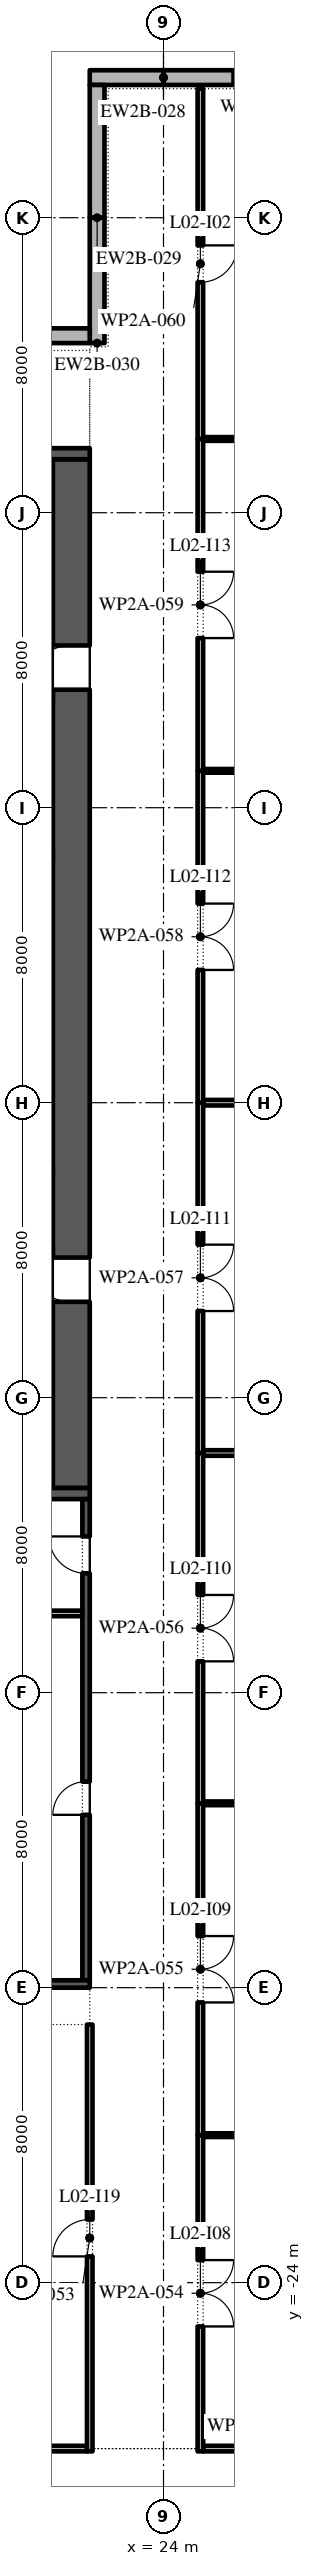
"""IFC4 building model, lengths in metres.
Left out: names, types, materials, properties, quantities, classifications, styles, units other than length and angle.
Written with IfcOpenShell. Run it as: python <this file> out.ifc"""

import sys

from ifc_helpers import new_model, si_unit, direction, frame, frame_2d, origin, place, context, subcontext, project, spatial, polyline, rectangle, outline, extrude, element, fill, save


model = new_model("IFC4")
c1 = context("Model", 3, precision=1e-05, world=origin(), true_north=direction((0.0, 1.0)))
c2 = subcontext(c1, "Body", "Model", "MODEL_VIEW")
j1 = project(units=[si_unit("LENGTHUNIT", "METRE"), si_unit("PLANEANGLEUNIT", "RADIAN")], contexts=[c1])
p1 = place(None, origin())
s1 = spatial("IfcSite", under=j1, at=p1, CompositionType="ELEMENT")
p2 = place(p1, origin())
s2 = spatial("IfcBuilding", under=s1, at=p2, CompositionType="ELEMENT")
p3 = place(p2, frame((0.0, 0.0, 14.0)))
s3 = spatial("IfcBuildingStorey", under=s2, at=p3, CompositionType="ELEMENT", Elevation=14.0)
p4 = place(p3, frame((32.0, 35.8, 0.0), z_axis=(0.0, 0.0, 1.0), x_axis=(-1.0, 0.0, 0.0)))
e1 = element("IfcWall", 1, at=p4, inside=s3, PredefinedType="STANDARD", context=c2, shape_type="SweptSolid", body=[
    extrude(rectangle(XDim=8.0, YDim=0.4, at=frame_2d((4.0, 0.0))), origin(), (0.0, 0.0, 1.0), 4.9),
])
p5 = place(p4, frame((1.9, 0.0, 0.9)))
e2 = element("IfcOpeningElement", 2, at=p5, cuts=e1, PredefinedType="OPENING", context=c2, shape_type="SweptSolid", body=[
    extrude(outline(polyline([(0.0, 0.0), (1.8, 0.0), (1.8, 1.841), (1.785, 2.076), (1.739, 2.307), (1.663, 2.53), (1.559, 2.741), (1.428, 2.937), (1.273, 3.114), (1.096, 3.269), (0.9, 3.4), (0.704, 3.269), (0.527, 3.114), (0.372, 2.937), (0.241, 2.741), (0.137, 2.53), (0.061, 2.307), (0.015, 2.076), (0.0, 1.841), (0.0, 0.0)])), frame((0.0, 0.21, 0.0), z_axis=(0.0, -1.0, 0.0), x_axis=(1.0, 0.0, 0.0)), (0.0, 0.0, 1.0), 0.42),
])
p6 = place(p4, frame((4.3, 0.0, 0.9)))
e3 = element("IfcOpeningElement", 3, at=p6, cuts=e1, PredefinedType="OPENING", context=c2, shape_type="SweptSolid", body=[
    extrude(outline(polyline([(0.0, 0.0), (1.8, 0.0), (1.8, 1.841), (1.785, 2.076), (1.739, 2.307), (1.663, 2.53), (1.559, 2.741), (1.428, 2.937), (1.273, 3.114), (1.096, 3.269), (0.9, 3.4), (0.704, 3.269), (0.527, 3.114), (0.372, 2.937), (0.241, 2.741), (0.137, 2.53), (0.061, 2.307), (0.015, 2.076), (0.0, 1.841), (0.0, 0.0)])), frame((0.0, 0.21, 0.0), z_axis=(0.0, -1.0, 0.0), x_axis=(1.0, 0.0, 0.0)), (0.0, 0.0, 1.0), 0.42),
])
p7 = place(p3, frame((24.0, 35.8, 0.0), z_axis=(0.0, 0.0, 1.0), x_axis=(-1.0, 0.0, 0.0)))
e4 = element("IfcWall", 4, at=p7, inside=s3, PredefinedType="STANDARD", context=c2, shape_type="SweptSolid", body=[
    extrude(rectangle(XDim=2.0, YDim=0.4, at=frame_2d((1.0, 0.0))), origin(), (0.0, 0.0, 1.0), 4.9),
])
p8 = place(p3, frame((22.2, 35.6, 0.0), z_axis=(0.0, 0.0, 1.0), x_axis=(0.0, -1.0, 0.0)))
e5 = element("IfcWall", 5, at=p8, inside=s3, PredefinedType="STANDARD", context=c2, shape_type="SweptSolid", body=[
    extrude(rectangle(XDim=3.6, YDim=0.4, at=frame_2d((1.8, 0.0))), origin(), (0.0, 0.0, 1.0), 4.9),
])
p9 = place(p3, frame((22.2, 32.0, 0.0), z_axis=(0.0, 0.0, 1.0), x_axis=(0.0, -1.0, 0.0)))
e6 = element("IfcWall", 6, at=p9, inside=s3, PredefinedType="STANDARD", context=c2, shape_type="SweptSolid", body=[
    extrude(rectangle(XDim=3.4, YDim=0.4, at=frame_2d((1.7, 0.0))), origin(), (0.0, 0.0, 1.0), 4.9),
])
p10 = place(p3, frame((22.0, 28.8, 0.0), z_axis=(0.0, 0.0, 1.0), x_axis=(-1.0, 0.0, 0.0)))
e7 = element("IfcWall", 7, at=p10, inside=s3, PredefinedType="STANDARD", context=c2, shape_type="SweptSolid", body=[
    extrude(rectangle(XDim=6.0, YDim=0.4, at=frame_2d((3.0, 0.0))), origin(), (0.0, 0.0, 1.0), 4.9),
])
p11 = place(p3, frame((21.5, -2.45, 0.0), z_axis=(0.0, 0.0, 1.0), x_axis=(0.0, 1.0, 0.0)))
e8 = element("IfcWall", 8, at=p11, inside=s3, PredefinedType="SHEAR", context=c2, shape_type="SweptSolid", body=[
    extrude(rectangle(XDim=27.9, YDim=1.0, at=frame_2d((13.95, 0.0))), origin(), (0.0, 0.0, 1.0), 4.9),
])
p12 = place(p11, frame((5.05, 0.0, 0.0)))
e9 = element("IfcOpeningElement", 9, at=p12, cuts=e8, PredefinedType="OPENING", context=c2, shape_type="SweptSolid", body=[
    extrude(rectangle(XDim=1.2, YDim=2.1, at=frame_2d((0.6, 1.05))), frame((0.0, 0.51, 0.0), z_axis=(0.0, -1.0, 0.0), x_axis=(1.0, 0.0, 0.0)), (0.0, 0.0, 1.0), 1.02),
])
p13 = place(p11, frame((21.65, 0.0, 0.0)))
e10 = element("IfcOpeningElement", 10, at=p13, cuts=e8, PredefinedType="OPENING", context=c2, shape_type="SweptSolid", body=[
    extrude(rectangle(XDim=1.2, YDim=2.1, at=frame_2d((0.6, 1.05))), frame((0.0, 0.51, 0.0), z_axis=(0.0, -1.0, 0.0), x_axis=(1.0, 0.0, 0.0)), (0.0, 0.0, 1.0), 1.02),
])
for number, where, z_axis, x_axis in (
    (11, (10.0, -2.6, 0.0), (0.0, 0.0, 1.0), (1.0, 0.0, 0.0)),
    (12, (10.0, 25.6, 0.0), (0.0, 0.0, 1.0), (1.0, 0.0, 0.0)),
):
    element("IfcWall", number, at=place(p3, frame(where, z_axis=z_axis, x_axis=x_axis)), inside=s3, PredefinedType="SHEAR", context=c2, shape_type="SweptSolid", body=[
        extrude(rectangle(XDim=12.0, YDim=0.3, at=frame_2d((6.0, 0.0))), origin(), (0.0, 0.0, 1.0), 4.9),
    ])
for number, where, z_axis, x_axis in (
    (13, (17.3, 4.0, 0.0), (0.0, 0.0, 1.0), (1.0, 0.0, 0.0)),
    (14, (17.3, 19.0, 0.0), (0.0, 0.0, 1.0), (1.0, 0.0, 0.0)),
):
    element("IfcWall", number, at=place(p3, frame(where, z_axis=z_axis, x_axis=x_axis)), inside=s3, PredefinedType="SHEAR", context=c2, shape_type="SweptSolid", body=[
        extrude(rectangle(XDim=3.7, YDim=0.3, at=frame_2d((1.85, 0.0))), origin(), (0.0, 0.0, 1.0), 4.9),
    ])
p14 = place(p3, frame((21.9, -15.8, 0.0), z_axis=(0.0, 0.0, 1.0), x_axis=(0.0, 1.0, 0.0)))
e15 = element("IfcWall", 15, at=p14, inside=s3, PredefinedType="SHEAR", context=c2, shape_type="SweptSolid", body=[
    extrude(rectangle(XDim=13.05, YDim=0.2, at=frame_2d((6.525, 0.0))), origin(), (0.0, 0.0, 1.0), 4.9),
])
p15 = place(p14, frame((4.488, 0.0, 0.0)))
e16 = element("IfcOpeningElement", 16, at=p15, cuts=e15, PredefinedType="OPENING", context=c2, shape_type="SweptSolid", body=[
    extrude(rectangle(XDim=0.9, YDim=2.1, at=frame_2d((0.45, 1.05))), frame((0.0, 0.11, 0.0), z_axis=(0.0, -1.0, 0.0), x_axis=(1.0, 0.0, 0.0)), (0.0, 0.0, 1.0), 0.22),
])
p16 = place(p14, frame((11.038, 0.0, 0.0)))
e17 = element("IfcOpeningElement", 17, at=p16, cuts=e15, PredefinedType="OPENING", context=c2, shape_type="SweptSolid", body=[
    extrude(rectangle(XDim=1.0, YDim=2.1, at=frame_2d((0.5, 1.05))), frame((0.0, 0.11, 0.0), z_axis=(0.0, -1.0, 0.0), x_axis=(1.0, 0.0, 0.0)), (0.0, 0.0, 1.0), 0.22),
])
p17 = place(p3, frame((10.0, -15.9, 0.0), z_axis=(0.0, 0.0, 1.0), x_axis=(1.0, 0.0, 0.0)))
e18 = element("IfcWall", 18, at=p17, inside=s3, PredefinedType="SHEAR", context=c2, shape_type="SweptSolid", body=[
    extrude(rectangle(XDim=12.0, YDim=0.2, at=frame_2d((6.0, 0.0))), origin(), (0.0, 0.0, 1.0), 4.9),
])
p18 = place(p3, frame((16.075, -5.85, 0.0), z_axis=(0.0, 0.0, 1.0), x_axis=(1.0, 0.0, 0.0)))
e19 = element("IfcWall", 19, at=p18, inside=s3, PredefinedType="PARTITIONING", context=c2, shape_type="SweptSolid", body=[
    extrude(rectangle(XDim=5.725, YDim=0.15, at=frame_2d((2.863, 0.0))), origin(), (0.0, 0.0, 1.0), 4.9),
])
p19 = place(p3, frame((10.4, -28.5, 0.0), z_axis=(0.0, 0.0, 1.0), x_axis=(1.0, 0.0, 0.0)))
e20 = element("IfcWall", 20, at=p19, inside=s3, PredefinedType="PARTITIONING", context=c2, shape_type="SweptSolid", body=[
    extrude(rectangle(XDim=11.525, YDim=0.15, at=frame_2d((5.763, 0.0))), origin(), (0.0, 0.0, 1.0), 4.9),
])
p20 = place(p3, frame((25.075, -28.5, 0.0), z_axis=(0.0, 0.0, 1.0), x_axis=(1.0, 0.0, 0.0)))
e21 = element("IfcWall", 21, at=p20, inside=s3, PredefinedType="PARTITIONING", context=c2, shape_type="SweptSolid", body=[
    extrude(rectangle(XDim=1.925, YDim=0.15, at=frame_2d((0.962, 0.0))), origin(), (0.0, 0.0, 1.0), 4.9),
])
p21 = place(p3, frame((25.075, -20.0, 0.0), z_axis=(0.0, 0.0, 1.0), x_axis=(1.0, 0.0, 0.0)))
e22 = element("IfcWall", 22, at=p21, inside=s3, PredefinedType="PARTITIONING", context=c2, shape_type="SweptSolid", body=[
    extrude(rectangle(XDim=18.425, YDim=0.1, at=frame_2d((9.212, 0.0))), origin(), (0.0, 0.0, 1.0), 4.9),
])
p22 = place(p3, frame((25.075, -11.0, 0.0), z_axis=(0.0, 0.0, 1.0), x_axis=(1.0, 0.0, 0.0)))
e23 = element("IfcWall", 23, at=p22, inside=s3, PredefinedType="PARTITIONING", context=c2, shape_type="SweptSolid", body=[
    extrude(rectangle(XDim=6.625, YDim=0.1, at=frame_2d((3.312, 0.0))), origin(), (0.0, 0.0, 1.0), 4.9),
])
for number, where, z_axis, x_axis in (
    (24, (25.075, -1.5, 0.0), (0.0, 0.0, 1.0), (1.0, 0.0, 0.0)),
    (25, (25.075, 8.0, 0.0), (0.0, 0.0, 1.0), (1.0, 0.0, 0.0)),
):
    element("IfcWall", number, at=place(p3, frame(where, z_axis=z_axis, x_axis=x_axis)), inside=s3, PredefinedType="PARTITIONING", context=c2, shape_type="SweptSolid", body=[
        extrude(rectangle(XDim=18.425, YDim=0.15, at=frame_2d((9.212, 0.0))), origin(), (0.0, 0.0, 1.0), 4.9),
    ])
p23 = place(p3, frame((25.075, 17.0, 0.0), z_axis=(0.0, 0.0, 1.0), x_axis=(1.0, 0.0, 0.0)))
e26 = element("IfcWall", 26, at=p23, inside=s3, PredefinedType="PARTITIONING", context=c2, shape_type="SweptSolid", body=[
    extrude(rectangle(XDim=18.425, YDim=0.1, at=frame_2d((9.212, 0.0))), origin(), (0.0, 0.0, 1.0), 4.9),
])
p24 = place(p3, frame((25.075, 26.0, 0.0), z_axis=(0.0, 0.0, 1.0), x_axis=(1.0, 0.0, 0.0)))
e27 = element("IfcWall", 27, at=p24, inside=s3, PredefinedType="PARTITIONING", context=c2, shape_type="SweptSolid", body=[
    extrude(rectangle(XDim=8.925, YDim=0.1, at=frame_2d((4.462, 0.0))), origin(), (0.0, 0.0, 1.0), 4.9),
])
p25 = place(p3, frame((22.0, -28.575, 0.0), z_axis=(0.0, 0.0, 1.0), x_axis=(0.0, 1.0, 0.0)))
e28 = element("IfcWall", 28, at=p25, inside=s3, PredefinedType="PARTITIONING", context=c2, shape_type="SweptSolid", body=[
    extrude(rectangle(XDim=11.575, YDim=0.15, at=frame_2d((5.788, 0.0))), origin(), (0.0, 0.0, 1.0), 4.9),
])
p26 = place(p25, frame((5.288, 0.0, 0.0)))
e29 = element("IfcOpeningElement", 29, at=p26, cuts=e28, PredefinedType="OPENING", context=c2, shape_type="SweptSolid", body=[
    extrude(rectangle(XDim=1.0, YDim=2.1, at=frame_2d((0.5, 1.05))), frame((0.0, 0.085, 0.0), z_axis=(0.0, -1.0, 0.0), x_axis=(1.0, 0.0, 0.0)), (0.0, 0.0, 1.0), 0.17),
])
p27 = place(p3, frame((25.0, -28.575, 0.0), z_axis=(0.0, 0.0, 1.0), x_axis=(0.0, 1.0, 0.0)))
e30 = element("IfcWall", 30, at=p27, inside=s3, PredefinedType="PARTITIONING", context=c2, shape_type="SweptSolid", body=[
    extrude(rectangle(XDim=8.575, YDim=0.15, at=frame_2d((4.288, 0.0))), origin(), (0.0, 0.0, 1.0), 4.9),
])
p28 = place(p27, frame((3.387, 0.0, 0.0)))
e31 = element("IfcOpeningElement", 31, at=p28, cuts=e30, PredefinedType="OPENING", context=c2, shape_type="SweptSolid", body=[
    extrude(rectangle(XDim=1.8, YDim=2.1, at=frame_2d((0.9, 1.05))), frame((0.0, 0.085, 0.0), z_axis=(0.0, -1.0, 0.0), x_axis=(1.0, 0.0, 0.0)), (0.0, 0.0, 1.0), 0.17),
])
p29 = place(p3, frame((25.0, -20.0, 0.0), z_axis=(0.0, 0.0, 1.0), x_axis=(0.0, 1.0, 0.0)))
e32 = element("IfcWall", 32, at=p29, inside=s3, PredefinedType="PARTITIONING", context=c2, shape_type="SweptSolid", body=[
    extrude(rectangle(XDim=9.0, YDim=0.15, at=frame_2d((4.5, 0.0))), origin(), (0.0, 0.0, 1.0), 4.9),
])
p30 = place(p29, frame((3.6, 0.0, 0.0)))
e33 = element("IfcOpeningElement", 33, at=p30, cuts=e32, PredefinedType="OPENING", context=c2, shape_type="SweptSolid", body=[
    extrude(rectangle(XDim=1.8, YDim=2.1, at=frame_2d((0.9, 1.05))), frame((0.0, 0.085, 0.0), z_axis=(0.0, -1.0, 0.0), x_axis=(1.0, 0.0, 0.0)), (0.0, 0.0, 1.0), 0.17),
])
p31 = place(p3, frame((25.0, -11.0, 0.0), z_axis=(0.0, 0.0, 1.0), x_axis=(0.0, 1.0, 0.0)))
e34 = element("IfcWall", 34, at=p31, inside=s3, PredefinedType="PARTITIONING", context=c2, shape_type="SweptSolid", body=[
    extrude(rectangle(XDim=9.5, YDim=0.15, at=frame_2d((4.75, 0.0))), origin(), (0.0, 0.0, 1.0), 4.9),
])
p32 = place(p31, frame((3.85, 0.0, 0.0)))
e35 = element("IfcOpeningElement", 35, at=p32, cuts=e34, PredefinedType="OPENING", context=c2, shape_type="SweptSolid", body=[
    extrude(rectangle(XDim=1.8, YDim=2.1, at=frame_2d((0.9, 1.05))), frame((0.0, 0.085, 0.0), z_axis=(0.0, -1.0, 0.0), x_axis=(1.0, 0.0, 0.0)), (0.0, 0.0, 1.0), 0.17),
])
p33 = place(p3, frame((25.0, -1.5, 0.0), z_axis=(0.0, 0.0, 1.0), x_axis=(0.0, 1.0, 0.0)))
e36 = element("IfcWall", 36, at=p33, inside=s3, PredefinedType="PARTITIONING", context=c2, shape_type="SweptSolid", body=[
    extrude(rectangle(XDim=9.5, YDim=0.15, at=frame_2d((4.75, 0.0))), origin(), (0.0, 0.0, 1.0), 4.9),
])
p34 = place(p33, frame((3.85, 0.0, 0.0)))
e37 = element("IfcOpeningElement", 37, at=p34, cuts=e36, PredefinedType="OPENING", context=c2, shape_type="SweptSolid", body=[
    extrude(rectangle(XDim=1.8, YDim=2.1, at=frame_2d((0.9, 1.05))), frame((0.0, 0.085, 0.0), z_axis=(0.0, -1.0, 0.0), x_axis=(1.0, 0.0, 0.0)), (0.0, 0.0, 1.0), 0.17),
])
p35 = place(p3, frame((25.0, 8.0, 0.0), z_axis=(0.0, 0.0, 1.0), x_axis=(0.0, 1.0, 0.0)))
e38 = element("IfcWall", 38, at=p35, inside=s3, PredefinedType="PARTITIONING", context=c2, shape_type="SweptSolid", body=[
    extrude(rectangle(XDim=9.0, YDim=0.15, at=frame_2d((4.5, 0.0))), origin(), (0.0, 0.0, 1.0), 4.9),
])
p36 = place(p35, frame((3.6, 0.0, 0.0)))
e39 = element("IfcOpeningElement", 39, at=p36, cuts=e38, PredefinedType="OPENING", context=c2, shape_type="SweptSolid", body=[
    extrude(rectangle(XDim=1.8, YDim=2.1, at=frame_2d((0.9, 1.05))), frame((0.0, 0.085, 0.0), z_axis=(0.0, -1.0, 0.0), x_axis=(1.0, 0.0, 0.0)), (0.0, 0.0, 1.0), 0.17),
])
p37 = place(p3, frame((25.0, 17.0, 0.0), z_axis=(0.0, 0.0, 1.0), x_axis=(0.0, 1.0, 0.0)))
e40 = element("IfcWall", 40, at=p37, inside=s3, PredefinedType="PARTITIONING", context=c2, shape_type="SweptSolid", body=[
    extrude(rectangle(XDim=9.0, YDim=0.15, at=frame_2d((4.5, 0.0))), origin(), (0.0, 0.0, 1.0), 4.9),
])
p38 = place(p37, frame((3.6, 0.0, 0.0)))
e41 = element("IfcOpeningElement", 41, at=p38, cuts=e40, PredefinedType="OPENING", context=c2, shape_type="SweptSolid", body=[
    extrude(rectangle(XDim=1.8, YDim=2.1, at=frame_2d((0.9, 1.05))), frame((0.0, 0.085, 0.0), z_axis=(0.0, -1.0, 0.0), x_axis=(1.0, 0.0, 0.0)), (0.0, 0.0, 1.0), 0.17),
])
p39 = place(p3, frame((25.0, 26.0, 0.0), z_axis=(0.0, 0.0, 1.0), x_axis=(0.0, 1.0, 0.0)))
e42 = element("IfcWall", 42, at=p39, inside=s3, PredefinedType="PARTITIONING", context=c2, shape_type="SweptSolid", body=[
    extrude(rectangle(XDim=9.5, YDim=0.15, at=frame_2d((4.75, 0.0))), origin(), (0.0, 0.0, 1.0), 4.9),
])
p40 = place(p39, frame((4.25, 0.0, 0.0)))
e43 = element("IfcOpeningElement", 43, at=p40, cuts=e42, PredefinedType="OPENING", context=c2, shape_type="SweptSolid", body=[
    extrude(rectangle(XDim=1.0, YDim=2.1, at=frame_2d((0.5, 1.05))), frame((0.0, 0.085, 0.0), z_axis=(0.0, -1.0, 0.0), x_axis=(1.0, 0.0, 0.0)), (0.0, 0.0, 1.0), 0.17),
])
p41 = place(p6, origin())
e44 = element("IfcWindow", 44, at=p41, inside=s3, PartitioningType="DOUBLE_PANEL_VERTICAL", PredefinedType="WINDOW", context=c2, shape_type="SweptSolid", body=[
    extrude(outline(polyline([(0.0, 0.0), (1.8, 0.0), (1.8, 1.841), (1.785, 2.076), (1.739, 2.307), (1.663, 2.53), (1.559, 2.741), (1.428, 2.937), (1.273, 3.114), (1.096, 3.269), (0.9, 3.4), (0.704, 3.269), (0.527, 3.114), (0.372, 2.937), (0.241, 2.741), (0.137, 2.53), (0.061, 2.307), (0.015, 2.076), (0.0, 1.841), (0.0, 0.0)])), frame((0.0, 0.03, 0.0), z_axis=(0.0, -1.0, 0.0), x_axis=(1.0, 0.0, 0.0)), (0.0, 0.0, 1.0), 0.06),
])
fill(e3, e44)
p42 = place(p12, origin())
e45 = element("IfcDoor", 45, at=p42, inside=s3, OperationType="SINGLE_SWING_LEFT", PredefinedType="DOOR", context=c2, shape_type="SweptSolid", body=[
    extrude(rectangle(XDim=1.2, YDim=2.1, at=frame_2d((0.6, 1.05))), frame((0.0, 0.025, 0.0), z_axis=(0.0, -1.0, 0.0), x_axis=(1.0, 0.0, 0.0)), (0.0, 0.0, 1.0), 0.05),
])
fill(e9, e45)
p43 = place(p13, origin())
e46 = element("IfcDoor", 46, at=p43, inside=s3, OperationType="SINGLE_SWING_RIGHT", PredefinedType="DOOR", context=c2, shape_type="SweptSolid", body=[
    extrude(rectangle(XDim=1.2, YDim=2.1, at=frame_2d((0.6, 1.05))), frame((0.0, 0.025, 0.0), z_axis=(0.0, -1.0, 0.0), x_axis=(1.0, 0.0, 0.0)), (0.0, 0.0, 1.0), 0.05),
])
fill(e10, e46)
p44 = place(p15, origin())
e47 = element("IfcDoor", 47, at=p44, inside=s3, OperationType="SINGLE_SWING_RIGHT", PredefinedType="DOOR", context=c2, shape_type="SweptSolid", body=[
    extrude(rectangle(XDim=0.9, YDim=2.1, at=frame_2d((0.45, 1.05))), frame((0.0, 0.1, 0.0), z_axis=(0.0, -1.0, 0.0), x_axis=(1.0, 0.0, 0.0)), (0.0, 0.0, 1.0), 0.05),
])
fill(e16, e47)
p45 = place(p16, origin())
e48 = element("IfcDoor", 48, at=p45, inside=s3, OperationType="SINGLE_SWING_LEFT", PredefinedType="DOOR", context=c2, shape_type="SweptSolid", body=[
    extrude(rectangle(XDim=1.0, YDim=2.1, at=frame_2d((0.5, 1.05))), frame((0.0, 0.1, 0.0), z_axis=(0.0, -1.0, 0.0), x_axis=(1.0, 0.0, 0.0)), (0.0, 0.0, 1.0), 0.05),
])
fill(e17, e48)
p46 = place(p40, frame((1.0, 0.0, 0.0), z_axis=(0.0, 0.0, 1.0), x_axis=(-1.0, 0.0, 0.0)))
e49 = element("IfcDoor", 49, at=p46, inside=s3, OperationType="SINGLE_SWING_RIGHT", PredefinedType="DOOR", context=c2, shape_type="SweptSolid", body=[
    extrude(rectangle(XDim=1.0, YDim=2.1, at=frame_2d((0.5, 1.05))), frame((0.0, 0.025, 0.0), z_axis=(0.0, -1.0, 0.0), x_axis=(1.0, 0.0, 0.0)), (0.0, 0.0, 1.0), 0.05),
])
fill(e43, e49)
p47 = place(p28, frame((1.8, 0.0, 0.0), z_axis=(0.0, 0.0, 1.0), x_axis=(-1.0, 0.0, 0.0)))
e50 = element("IfcDoor", 50, at=p47, inside=s3, OperationType="SINGLE_SWING_RIGHT", PredefinedType="DOOR", context=c2, shape_type="SweptSolid", body=[
    extrude(rectangle(XDim=1.8, YDim=2.1, at=frame_2d((0.9, 1.05))), frame((0.0, 0.025, 0.0), z_axis=(0.0, -1.0, 0.0), x_axis=(1.0, 0.0, 0.0)), (0.0, 0.0, 1.0), 0.05),
])
fill(e31, e50)
p48 = place(p30, frame((1.8, 0.0, 0.0), z_axis=(0.0, 0.0, 1.0), x_axis=(-1.0, 0.0, 0.0)))
e51 = element("IfcDoor", 51, at=p48, inside=s3, OperationType="SINGLE_SWING_RIGHT", PredefinedType="DOOR", context=c2, shape_type="SweptSolid", body=[
    extrude(rectangle(XDim=1.8, YDim=2.1, at=frame_2d((0.9, 1.05))), frame((0.0, 0.025, 0.0), z_axis=(0.0, -1.0, 0.0), x_axis=(1.0, 0.0, 0.0)), (0.0, 0.0, 1.0), 0.05),
])
fill(e33, e51)
p49 = place(p32, frame((1.8, 0.0, 0.0), z_axis=(0.0, 0.0, 1.0), x_axis=(-1.0, 0.0, 0.0)))
e52 = element("IfcDoor", 52, at=p49, inside=s3, OperationType="SINGLE_SWING_LEFT", PredefinedType="DOOR", context=c2, shape_type="SweptSolid", body=[
    extrude(rectangle(XDim=1.8, YDim=2.1, at=frame_2d((0.9, 1.05))), frame((0.0, 0.025, 0.0), z_axis=(0.0, -1.0, 0.0), x_axis=(1.0, 0.0, 0.0)), (0.0, 0.0, 1.0), 0.05),
])
fill(e35, e52)
p50 = place(p34, frame((1.8, 0.0, 0.0), z_axis=(0.0, 0.0, 1.0), x_axis=(-1.0, 0.0, 0.0)))
e53 = element("IfcDoor", 53, at=p50, inside=s3, OperationType="SINGLE_SWING_LEFT", PredefinedType="DOOR", context=c2, shape_type="SweptSolid", body=[
    extrude(rectangle(XDim=1.8, YDim=2.1, at=frame_2d((0.9, 1.05))), frame((0.0, 0.025, 0.0), z_axis=(0.0, -1.0, 0.0), x_axis=(1.0, 0.0, 0.0)), (0.0, 0.0, 1.0), 0.05),
])
fill(e37, e53)
p51 = place(p36, frame((1.8, 0.0, 0.0), z_axis=(0.0, 0.0, 1.0), x_axis=(-1.0, 0.0, 0.0)))
e54 = element("IfcDoor", 54, at=p51, inside=s3, OperationType="SINGLE_SWING_LEFT", PredefinedType="DOOR", context=c2, shape_type="SweptSolid", body=[
    extrude(rectangle(XDim=1.8, YDim=2.1, at=frame_2d((0.9, 1.05))), frame((0.0, 0.025, 0.0), z_axis=(0.0, -1.0, 0.0), x_axis=(1.0, 0.0, 0.0)), (0.0, 0.0, 1.0), 0.05),
])
fill(e39, e54)
p52 = place(p38, frame((1.8, 0.0, 0.0), z_axis=(0.0, 0.0, 1.0), x_axis=(-1.0, 0.0, 0.0)))
e55 = element("IfcDoor", 55, at=p52, inside=s3, OperationType="SINGLE_SWING_LEFT", PredefinedType="DOOR", context=c2, shape_type="SweptSolid", body=[
    extrude(rectangle(XDim=1.8, YDim=2.1, at=frame_2d((0.9, 1.05))), frame((0.0, 0.025, 0.0), z_axis=(0.0, -1.0, 0.0), x_axis=(1.0, 0.0, 0.0)), (0.0, 0.0, 1.0), 0.05),
])
fill(e41, e55)
p53 = place(p26, origin())
e56 = element("IfcDoor", 56, at=p53, inside=s3, OperationType="SINGLE_SWING_RIGHT", PredefinedType="DOOR", context=c2, shape_type="SweptSolid", body=[
    extrude(rectangle(XDim=1.0, YDim=2.1, at=frame_2d((0.5, 1.05))), frame((0.0, 0.025, 0.0), z_axis=(0.0, -1.0, 0.0), x_axis=(1.0, 0.0, 0.0)), (0.0, 0.0, 1.0), 0.05),
])
fill(e29, e56)
save(model, sys.argv[1])
